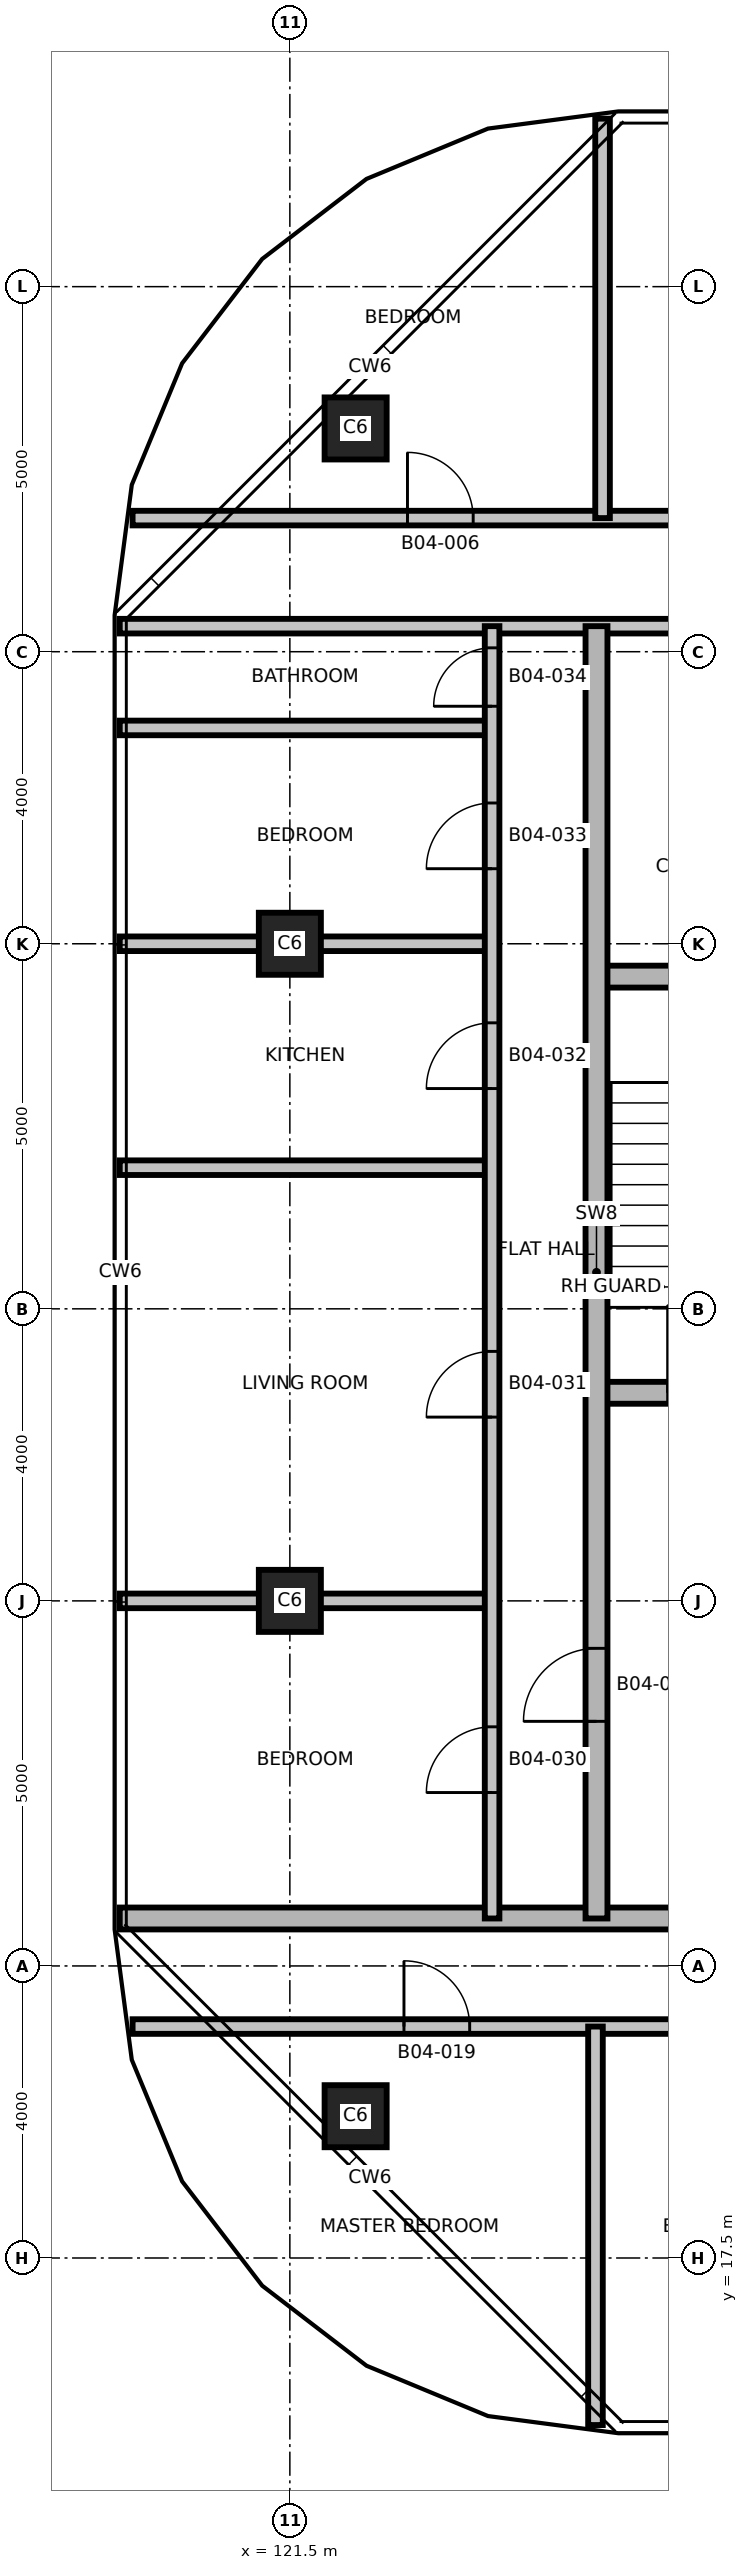
"""IFC4 building model, lengths in metres.
Left out: names, types, materials, properties, quantities, classifications, styles, units other than length and angle.
Written with IfcOpenShell. Run it as: python <this file> out.ifc"""

import sys

from ifc_helpers import new_model, si_unit, direction, frame, frame_2d, origin, origin_2d, place, context, subcontext, project, spatial, rectangle, extrude, element, fill, save


model = new_model("IFC4")
c1 = context("Model", 3, precision=1e-05, world=origin(), true_north=direction((0.0, 1.0)))
c2 = subcontext(c1, "Body", "Model", "MODEL_VIEW")
j1 = project(units=[si_unit("LENGTHUNIT", "METRE"), si_unit("PLANEANGLEUNIT", "RADIAN")], contexts=[c1])
p1 = place(None, origin())
s1 = spatial("IfcSite", under=j1, at=p1, CompositionType="ELEMENT")
p2 = place(p1, origin())
s2 = spatial("IfcBuilding", under=s1, at=p2, CompositionType="ELEMENT")
p3 = place(p2, frame((0.0, 0.0, 66.8)))
s3 = spatial("IfcBuildingStorey", under=s2, at=p3, CompositionType="ELEMENT", Elevation=66.8)
for number, where, z_axis, x_axis in (
    (1, (122.401, 19.442, 0.0), (0.0, 0.0, 1.0), (1.0, 0.0, 0.0)),
    (2, (121.5, 26.5, 0.0), (0.0, 0.0, 1.0), (1.0, 0.0, 0.0)),
    (3, (121.5, 35.5, 0.0), (0.0, 0.0, 1.0), (1.0, 0.0, 0.0)),
    (4, (122.401, 42.558, 0.0), (0.0, 0.0, 1.0), (1.0, 0.0, 0.0)),
):
    element("IfcColumn", number, at=place(p3, frame(where, z_axis=z_axis, x_axis=x_axis)), inside=s3, PredefinedType="COLUMN", context=c2, shape_type="SweptSolid", body=[
        extrude(rectangle(XDim=0.85, YDim=0.85, at=origin_2d()), origin(), (0.0, 0.0, 1.0), 3.7),
    ])
p4 = place(p3, frame((119.346, 20.67, 0.0), z_axis=(0.0, 0.0, 1.0), x_axis=(1.0, 0.0, 0.0)))
e5 = element("IfcWall", 5, at=p4, inside=s3, PredefinedType="PARTITIONING", context=c2, shape_type="SweptSolid", body=[
    extrude(rectangle(XDim=17.154, YDim=0.2, at=frame_2d((8.577, 0.0))), origin(), (0.0, 0.0, 1.0), 3.4),
])
p5 = place(p4, frame((3.717, 0.0, 0.0)))
e6 = element("IfcOpeningElement", 6, at=p5, cuts=e5, PredefinedType="OPENING", context=c2, shape_type="SweptSolid", body=[
    extrude(rectangle(XDim=0.9, YDim=2.1, at=frame_2d((0.45, 1.05))), frame((0.0, 0.11, 0.0), z_axis=(0.0, -1.0, 0.0), x_axis=(1.0, 0.0, 0.0)), (0.0, 0.0, 1.0), 0.22),
])
p6 = place(p4, frame((7.597, 0.0, 0.0)))
e7 = element("IfcOpeningElement", 7, at=p6, cuts=e5, PredefinedType="OPENING", context=c2, shape_type="SweptSolid", body=[
    extrude(rectangle(XDim=0.8, YDim=2.1, at=frame_2d((0.4, 1.05))), frame((0.0, 0.11, 0.0), z_axis=(0.0, -1.0, 0.0), x_axis=(1.0, 0.0, 0.0)), (0.0, 0.0, 1.0), 0.22),
])
p7 = place(p4, frame((11.671, 0.0, 0.0)))
e8 = element("IfcOpeningElement", 8, at=p7, cuts=e5, PredefinedType="OPENING", context=c2, shape_type="SweptSolid", body=[
    extrude(rectangle(XDim=0.9, YDim=2.1, at=frame_2d((0.45, 1.05))), frame((0.0, 0.11, 0.0), z_axis=(0.0, -1.0, 0.0), x_axis=(1.0, 0.0, 0.0)), (0.0, 0.0, 1.0), 0.22),
])
p8 = place(p4, frame((15.421, 0.0, 0.0)))
e9 = element("IfcOpeningElement", 9, at=p8, cuts=e5, PredefinedType="OPENING", context=c2, shape_type="SweptSolid", body=[
    extrude(rectangle(XDim=0.9, YDim=2.1, at=frame_2d((0.45, 1.05))), frame((0.0, 0.11, 0.0), z_axis=(0.0, -1.0, 0.0), x_axis=(1.0, 0.0, 0.0)), (0.0, 0.0, 1.0), 0.22),
])
p9 = place(p3, frame((119.17, 22.15, 0.0), z_axis=(0.0, 0.0, 1.0), x_axis=(1.0, 0.0, 0.0)))
e10 = element("IfcWall", 10, at=p9, inside=s3, PredefinedType="SHEAR", context=c2, shape_type="SweptSolid", body=[
    extrude(rectangle(XDim=34.66, YDim=0.3, at=frame_2d((17.33, 0.0))), origin(), (0.0, 0.0, 1.0), 3.4),
])
p10 = place(p9, frame((23.58, 0.0, 0.0)))
e11 = element("IfcOpeningElement", 11, at=p10, cuts=e10, PredefinedType="OPENING", context=c2, shape_type="SweptSolid", body=[
    extrude(rectangle(XDim=1.0, YDim=2.1, at=frame_2d((0.5, 1.05))), frame((0.0, 0.16, 0.0), z_axis=(0.0, -1.0, 0.0), x_axis=(1.0, 0.0, 0.0)), (0.0, 0.0, 1.0), 0.32),
])
p11 = place(p9, frame((11.93, 0.0, 0.0)))
e12 = element("IfcOpeningElement", 12, at=p11, cuts=e10, PredefinedType="OPENING", context=c2, shape_type="SweptSolid", body=[
    extrude(rectangle(XDim=1.0, YDim=2.1, at=frame_2d((0.5, 1.05))), frame((0.0, 0.16, 0.0), z_axis=(0.0, -1.0, 0.0), x_axis=(1.0, 0.0, 0.0)), (0.0, 0.0, 1.0), 0.32),
])
p12 = place(p9, frame((25.48, 0.0, 0.0)))
e13 = element("IfcOpeningElement", 13, at=p12, cuts=e10, PredefinedType="OPENING", context=c2, shape_type="SweptSolid", body=[
    extrude(rectangle(XDim=1.0, YDim=2.1, at=frame_2d((0.5, 1.05))), frame((0.0, 0.16, 0.0), z_axis=(0.0, -1.0, 0.0), x_axis=(1.0, 0.0, 0.0)), (0.0, 0.0, 1.0), 0.32),
])
p13 = place(p9, frame((17.58, 0.0, 0.0)))
e14 = element("IfcOpeningElement", 14, at=p13, cuts=e10, PredefinedType="OPENING", context=c2, shape_type="SweptSolid", body=[
    extrude(rectangle(XDim=0.9, YDim=2.1, at=frame_2d((0.45, 1.05))), frame((0.0, 0.16, 0.0), z_axis=(0.0, -1.0, 0.0), x_axis=(1.0, 0.0, 0.0)), (0.0, 0.0, 1.0), 0.32),
])
p14 = place(p3, frame((119.17, 26.5, 0.0), z_axis=(0.0, 0.0, 1.0), x_axis=(1.0, 0.0, 0.0)))
e15 = element("IfcWall", 15, at=p14, inside=s3, PredefinedType="PARTITIONING", context=c2, shape_type="SweptSolid", body=[
    extrude(rectangle(XDim=5.1, YDim=0.2, at=frame_2d((2.55, 0.0))), origin(), (0.0, 0.0, 1.0), 3.4),
])
p15 = place(p3, frame((125.7, 29.35, 0.0), z_axis=(0.0, 0.0, 1.0), x_axis=(1.0, 0.0, 0.0)))
e16 = element("IfcWall", 16, at=p15, inside=s3, PredefinedType="SHEAR", context=c2, shape_type="SweptSolid", body=[
    extrude(rectangle(XDim=2.83, YDim=0.3, at=frame_2d((1.415, 0.0))), origin(), (0.0, 0.0, 1.0), 3.4),
])
p16 = place(p15, frame((0.975, 0.0, 0.0)))
e17 = element("IfcOpeningElement", 17, at=p16, cuts=e16, PredefinedType="OPENING", context=c2, shape_type="SweptSolid", body=[
    extrude(rectangle(XDim=1.2, YDim=2.1, at=frame_2d((0.6, 1.05))), frame((0.0, 0.16, 0.0), z_axis=(0.0, -1.0, 0.0), x_axis=(1.0, 0.0, 0.0)), (0.0, 0.0, 1.0), 0.32),
])
p17 = place(p3, frame((119.17, 32.433, 0.0), z_axis=(0.0, 0.0, 1.0), x_axis=(1.0, 0.0, 0.0)))
e18 = element("IfcWall", 18, at=p17, inside=s3, PredefinedType="PARTITIONING", context=c2, shape_type="SweptSolid", body=[
    extrude(rectangle(XDim=5.1, YDim=0.2, at=frame_2d((2.55, 0.0))), origin(), (0.0, 0.0, 1.0), 3.4),
])
p18 = place(p3, frame((125.7, 35.05, 0.0), z_axis=(0.0, 0.0, 1.0), x_axis=(1.0, 0.0, 0.0)))
e19 = element("IfcWall", 19, at=p18, inside=s3, PredefinedType="SHEAR", context=c2, shape_type="SweptSolid", body=[
    extrude(rectangle(XDim=2.83, YDim=0.3, at=frame_2d((1.415, 0.0))), origin(), (0.0, 0.0, 1.0), 3.4),
])
for number, where, z_axis, x_axis in (
    (20, (119.17, 35.5, 0.0), (0.0, 0.0, 1.0), (1.0, 0.0, 0.0)),
    (21, (119.17, 38.456, 0.0), (0.0, 0.0, 1.0), (1.0, 0.0, 0.0)),
):
    element("IfcWall", number, at=place(p3, frame(where, z_axis=z_axis, x_axis=x_axis)), inside=s3, PredefinedType="PARTITIONING", context=c2, shape_type="SweptSolid", body=[
        extrude(rectangle(XDim=5.1, YDim=0.2, at=frame_2d((2.55, 0.0))), origin(), (0.0, 0.0, 1.0), 3.4),
    ])
p19 = place(p3, frame((119.17, 39.85, 0.0), z_axis=(0.0, 0.0, 1.0), x_axis=(1.0, 0.0, 0.0)))
e22 = element("IfcWall", 22, at=p19, inside=s3, PredefinedType="PARTITIONING", context=c2, shape_type="SweptSolid", body=[
    extrude(rectangle(XDim=34.66, YDim=0.2, at=frame_2d((17.33, 0.0))), origin(), (0.0, 0.0, 1.0), 3.4),
])
p20 = place(p19, frame((11.93, 0.0, 0.0)))
e23 = element("IfcOpeningElement", 23, at=p20, cuts=e22, PredefinedType="OPENING", context=c2, shape_type="SweptSolid", body=[
    extrude(rectangle(XDim=1.0, YDim=2.1, at=frame_2d((0.5, 1.05))), frame((0.0, 0.11, 0.0), z_axis=(0.0, -1.0, 0.0), x_axis=(1.0, 0.0, 0.0)), (0.0, 0.0, 1.0), 0.22),
])
p21 = place(p19, frame((20.58, 0.0, 0.0)))
e24 = element("IfcOpeningElement", 24, at=p21, cuts=e22, PredefinedType="OPENING", context=c2, shape_type="SweptSolid", body=[
    extrude(rectangle(XDim=1.0, YDim=2.1, at=frame_2d((0.5, 1.05))), frame((0.0, 0.11, 0.0), z_axis=(0.0, -1.0, 0.0), x_axis=(1.0, 0.0, 0.0)), (0.0, 0.0, 1.0), 0.22),
])
p22 = place(p19, frame((25.48, 0.0, 0.0)))
e25 = element("IfcOpeningElement", 25, at=p22, cuts=e22, PredefinedType="OPENING", context=c2, shape_type="SweptSolid", body=[
    extrude(rectangle(XDim=1.0, YDim=2.1, at=frame_2d((0.5, 1.05))), frame((0.0, 0.11, 0.0), z_axis=(0.0, -1.0, 0.0), x_axis=(1.0, 0.0, 0.0)), (0.0, 0.0, 1.0), 0.22),
])
p23 = place(p3, frame((119.346, 41.33, 0.0), z_axis=(0.0, 0.0, 1.0), x_axis=(1.0, 0.0, 0.0)))
e26 = element("IfcWall", 26, at=p23, inside=s3, PredefinedType="PARTITIONING", context=c2, shape_type="SweptSolid", body=[
    extrude(rectangle(XDim=34.308, YDim=0.2, at=frame_2d((17.154, 0.0))), origin(), (0.0, 0.0, 1.0), 3.4),
])
p24 = place(p23, frame((3.765, 0.0, 0.0)))
e27 = element("IfcOpeningElement", 27, at=p24, cuts=e26, PredefinedType="OPENING", context=c2, shape_type="SweptSolid", body=[
    extrude(rectangle(XDim=0.9, YDim=2.1, at=frame_2d((0.45, 1.05))), frame((0.0, 0.11, 0.0), z_axis=(0.0, -1.0, 0.0), x_axis=(1.0, 0.0, 0.0)), (0.0, 0.0, 1.0), 0.22),
])
p25 = place(p23, frame((7.645, 0.0, 0.0)))
e28 = element("IfcOpeningElement", 28, at=p25, cuts=e26, PredefinedType="OPENING", context=c2, shape_type="SweptSolid", body=[
    extrude(rectangle(XDim=0.8, YDim=2.1, at=frame_2d((0.4, 1.05))), frame((0.0, 0.11, 0.0), z_axis=(0.0, -1.0, 0.0), x_axis=(1.0, 0.0, 0.0)), (0.0, 0.0, 1.0), 0.22),
])
p26 = place(p23, frame((11.671, 0.0, 0.0)))
e29 = element("IfcOpeningElement", 29, at=p26, cuts=e26, PredefinedType="OPENING", context=c2, shape_type="SweptSolid", body=[
    extrude(rectangle(XDim=0.9, YDim=2.1, at=frame_2d((0.45, 1.05))), frame((0.0, 0.11, 0.0), z_axis=(0.0, -1.0, 0.0), x_axis=(1.0, 0.0, 0.0)), (0.0, 0.0, 1.0), 0.22),
])
p27 = place(p23, frame((15.421, 0.0, 0.0)))
e30 = element("IfcOpeningElement", 30, at=p27, cuts=e26, PredefinedType="OPENING", context=c2, shape_type="SweptSolid", body=[
    extrude(rectangle(XDim=0.9, YDim=2.1, at=frame_2d((0.45, 1.05))), frame((0.0, 0.11, 0.0), z_axis=(0.0, -1.0, 0.0), x_axis=(1.0, 0.0, 0.0)), (0.0, 0.0, 1.0), 0.22),
])
p28 = place(p23, frame((18.756, 0.0, 0.0)))
e31 = element("IfcOpeningElement", 31, at=p28, cuts=e26, PredefinedType="OPENING", context=c2, shape_type="SweptSolid", body=[
    extrude(rectangle(XDim=0.9, YDim=2.1, at=frame_2d((0.45, 1.05))), frame((0.0, 0.11, 0.0), z_axis=(0.0, -1.0, 0.0), x_axis=(1.0, 0.0, 0.0)), (0.0, 0.0, 1.0), 0.22),
])
p29 = place(p23, frame((21.725, 0.0, 0.0)))
e32 = element("IfcOpeningElement", 32, at=p29, cuts=e26, PredefinedType="OPENING", context=c2, shape_type="SweptSolid", body=[
    extrude(rectangle(XDim=0.9, YDim=2.1, at=frame_2d((0.45, 1.05))), frame((0.0, 0.11, 0.0), z_axis=(0.0, -1.0, 0.0), x_axis=(1.0, 0.0, 0.0)), (0.0, 0.0, 1.0), 0.22),
])
p30 = place(p23, frame((23.473, 0.0, 0.0)))
e33 = element("IfcOpeningElement", 33, at=p30, cuts=e26, PredefinedType="OPENING", context=c2, shape_type="SweptSolid", body=[
    extrude(rectangle(XDim=0.8, YDim=2.1, at=frame_2d((0.4, 1.05))), frame((0.0, 0.11, 0.0), z_axis=(0.0, -1.0, 0.0), x_axis=(1.0, 0.0, 0.0)), (0.0, 0.0, 1.0), 0.22),
])
p31 = place(p23, frame((25.282, 0.0, 0.0)))
e34 = element("IfcOpeningElement", 34, at=p31, cuts=e26, PredefinedType="OPENING", context=c2, shape_type="SweptSolid", body=[
    extrude(rectangle(XDim=0.8, YDim=2.1, at=frame_2d((0.4, 1.05))), frame((0.0, 0.11, 0.0), z_axis=(0.0, -1.0, 0.0), x_axis=(1.0, 0.0, 0.0)), (0.0, 0.0, 1.0), 0.22),
])
p32 = place(p23, frame((27.472, 0.0, 0.0)))
e35 = element("IfcOpeningElement", 35, at=p32, cuts=e26, PredefinedType="OPENING", context=c2, shape_type="SweptSolid", body=[
    extrude(rectangle(XDim=0.9, YDim=2.1, at=frame_2d((0.45, 1.05))), frame((0.0, 0.11, 0.0), z_axis=(0.0, -1.0, 0.0), x_axis=(1.0, 0.0, 0.0)), (0.0, 0.0, 1.0), 0.22),
])
p33 = place(p23, frame((32.025, 0.0, 0.0)))
e36 = element("IfcOpeningElement", 36, at=p33, cuts=e26, PredefinedType="OPENING", context=c2, shape_type="SweptSolid", body=[
    extrude(rectangle(XDim=0.9, YDim=2.1, at=frame_2d((0.45, 1.05))), frame((0.0, 0.11, 0.0), z_axis=(0.0, -1.0, 0.0), x_axis=(1.0, 0.0, 0.0)), (0.0, 0.0, 1.0), 0.22),
])
p34 = place(p3, frame((124.27, 22.15, 0.0), z_axis=(0.0, 0.0, 1.0), x_axis=(0.0, 1.0, 0.0)))
e37 = element("IfcWall", 37, at=p34, inside=s3, PredefinedType="PARTITIONING", context=c2, shape_type="SweptSolid", body=[
    extrude(rectangle(XDim=17.7, YDim=0.2, at=frame_2d((8.85, 0.0))), origin(), (0.0, 0.0, 1.0), 3.4),
])
p35 = place(p34, frame((1.725, 0.0, 0.0)))
e38 = element("IfcOpeningElement", 38, at=p35, cuts=e37, PredefinedType="OPENING", context=c2, shape_type="SweptSolid", body=[
    extrude(rectangle(XDim=0.9, YDim=2.1, at=frame_2d((0.45, 1.05))), frame((0.0, 0.11, 0.0), z_axis=(0.0, -1.0, 0.0), x_axis=(1.0, 0.0, 0.0)), (0.0, 0.0, 1.0), 0.22),
])
p36 = place(p34, frame((6.867, 0.0, 0.0)))
e39 = element("IfcOpeningElement", 39, at=p36, cuts=e37, PredefinedType="OPENING", context=c2, shape_type="SweptSolid", body=[
    extrude(rectangle(XDim=0.9, YDim=2.1, at=frame_2d((0.45, 1.05))), frame((0.0, 0.11, 0.0), z_axis=(0.0, -1.0, 0.0), x_axis=(1.0, 0.0, 0.0)), (0.0, 0.0, 1.0), 0.22),
])
p37 = place(p34, frame((11.367, 0.0, 0.0)))
e40 = element("IfcOpeningElement", 40, at=p37, cuts=e37, PredefinedType="OPENING", context=c2, shape_type="SweptSolid", body=[
    extrude(rectangle(XDim=0.9, YDim=2.1, at=frame_2d((0.45, 1.05))), frame((0.0, 0.11, 0.0), z_axis=(0.0, -1.0, 0.0), x_axis=(1.0, 0.0, 0.0)), (0.0, 0.0, 1.0), 0.22),
])
p38 = place(p34, frame((14.378, 0.0, 0.0)))
e41 = element("IfcOpeningElement", 41, at=p38, cuts=e37, PredefinedType="OPENING", context=c2, shape_type="SweptSolid", body=[
    extrude(rectangle(XDim=0.9, YDim=2.1, at=frame_2d((0.45, 1.05))), frame((0.0, 0.11, 0.0), z_axis=(0.0, -1.0, 0.0), x_axis=(1.0, 0.0, 0.0)), (0.0, 0.0, 1.0), 0.22),
])
p39 = place(p34, frame((16.603, 0.0, 0.0)))
e42 = element("IfcOpeningElement", 42, at=p39, cuts=e37, PredefinedType="OPENING", context=c2, shape_type="SweptSolid", body=[
    extrude(rectangle(XDim=0.8, YDim=2.1, at=frame_2d((0.4, 1.05))), frame((0.0, 0.11, 0.0), z_axis=(0.0, -1.0, 0.0), x_axis=(1.0, 0.0, 0.0)), (0.0, 0.0, 1.0), 0.22),
])
p40 = place(p3, frame((125.686, 15.212, 0.0), z_axis=(0.0, 0.0, 1.0), x_axis=(0.0, 1.0, 0.0)))
e43 = element("IfcWall", 43, at=p40, inside=s3, PredefinedType="PARTITIONING", context=c2, shape_type="SweptSolid", body=[
    extrude(rectangle(XDim=5.458, YDim=0.2, at=frame_2d((2.729, 0.0))), origin(), (0.0, 0.0, 1.0), 3.4),
])
p41 = place(p3, frame((125.7, 22.15, 0.0), z_axis=(0.0, 0.0, 1.0), x_axis=(0.0, 1.0, 0.0)))
e44 = element("IfcWall", 44, at=p41, inside=s3, PredefinedType="SHEAR", context=c2, shape_type="SweptSolid", body=[
    extrude(rectangle(XDim=17.7, YDim=0.3, at=frame_2d((8.85, 0.0))), origin(), (0.0, 0.0, 1.0), 3.4),
])
p42 = place(p41, frame((2.7, 0.0, 0.0)))
e45 = element("IfcOpeningElement", 45, at=p42, cuts=e44, PredefinedType="OPENING", context=c2, shape_type="SweptSolid", body=[
    extrude(rectangle(XDim=1.0, YDim=2.1, at=frame_2d((0.5, 1.05))), frame((0.0, 0.16, 0.0), z_axis=(0.0, -1.0, 0.0), x_axis=(1.0, 0.0, 0.0)), (0.0, 0.0, 1.0), 0.32),
])
p43 = place(p3, frame((125.783, 41.33, 0.0), z_axis=(0.0, 0.0, 1.0), x_axis=(0.0, 1.0, 0.0)))
e46 = element("IfcWall", 46, at=p43, inside=s3, PredefinedType="PARTITIONING", context=c2, shape_type="SweptSolid", body=[
    extrude(rectangle(XDim=5.471, YDim=0.2, at=frame_2d((2.735, 0.0))), origin(), (0.0, 0.0, 1.0), 3.4),
])
p44 = place(p16, origin())
e47 = element("IfcDoor", 47, at=p44, inside=s3, OperationType="SINGLE_SWING_RIGHT", PredefinedType="DOOR", context=c2, shape_type="SweptSolid", body=[
    extrude(rectangle(XDim=1.2, YDim=2.1, at=frame_2d((0.6, 1.05))), frame((0.0, 0.025, 0.0), z_axis=(0.0, -1.0, 0.0), x_axis=(1.0, 0.0, 0.0)), (0.0, 0.0, 1.0), 0.05),
])
fill(e17, e47)
p45 = place(p24, origin())
e48 = element("IfcDoor", 48, at=p45, inside=s3, OperationType="SINGLE_SWING_RIGHT", PredefinedType="DOOR", context=c2, shape_type="SweptSolid", body=[
    extrude(rectangle(XDim=0.9, YDim=2.1, at=frame_2d((0.45, 1.05))), frame((0.0, 0.025, 0.0), z_axis=(0.0, -1.0, 0.0), x_axis=(1.0, 0.0, 0.0)), (0.0, 0.0, 1.0), 0.05),
])
fill(e27, e48)
p46 = place(p5, origin())
e49 = element("IfcDoor", 49, at=p46, inside=s3, OperationType="SINGLE_SWING_LEFT", PredefinedType="DOOR", context=c2, shape_type="SweptSolid", body=[
    extrude(rectangle(XDim=0.9, YDim=2.1, at=frame_2d((0.45, 1.05))), frame((0.0, 0.025, 0.0), z_axis=(0.0, -1.0, 0.0), x_axis=(1.0, 0.0, 0.0)), (0.0, 0.0, 1.0), 0.05),
])
fill(e6, e49)
p47 = place(p42, origin())
e50 = element("IfcDoor", 50, at=p47, inside=s3, OperationType="SINGLE_SWING_LEFT", PredefinedType="DOOR", context=c2, shape_type="SweptSolid", body=[
    extrude(rectangle(XDim=1.0, YDim=2.1, at=frame_2d((0.5, 1.05))), frame((0.0, 0.025, 0.0), z_axis=(0.0, -1.0, 0.0), x_axis=(1.0, 0.0, 0.0)), (0.0, 0.0, 1.0), 0.05),
])
fill(e45, e50)
p48 = place(p35, origin())
e51 = element("IfcDoor", 51, at=p48, inside=s3, OperationType="SINGLE_SWING_RIGHT", PredefinedType="DOOR", context=c2, shape_type="SweptSolid", body=[
    extrude(rectangle(XDim=0.9, YDim=2.1, at=frame_2d((0.45, 1.05))), frame((0.0, 0.025, 0.0), z_axis=(0.0, -1.0, 0.0), x_axis=(1.0, 0.0, 0.0)), (0.0, 0.0, 1.0), 0.05),
])
fill(e38, e51)
p49 = place(p36, origin())
e52 = element("IfcDoor", 52, at=p49, inside=s3, OperationType="SINGLE_SWING_LEFT", PredefinedType="DOOR", context=c2, shape_type="SweptSolid", body=[
    extrude(rectangle(XDim=0.9, YDim=2.1, at=frame_2d((0.45, 1.05))), frame((0.0, 0.025, 0.0), z_axis=(0.0, -1.0, 0.0), x_axis=(1.0, 0.0, 0.0)), (0.0, 0.0, 1.0), 0.05),
])
fill(e39, e52)
p50 = place(p37, origin())
e53 = element("IfcDoor", 53, at=p50, inside=s3, OperationType="SINGLE_SWING_RIGHT", PredefinedType="DOOR", context=c2, shape_type="SweptSolid", body=[
    extrude(rectangle(XDim=0.9, YDim=2.1, at=frame_2d((0.45, 1.05))), frame((0.0, 0.025, 0.0), z_axis=(0.0, -1.0, 0.0), x_axis=(1.0, 0.0, 0.0)), (0.0, 0.0, 1.0), 0.05),
])
fill(e40, e53)
p51 = place(p38, origin())
e54 = element("IfcDoor", 54, at=p51, inside=s3, OperationType="SINGLE_SWING_LEFT", PredefinedType="DOOR", context=c2, shape_type="SweptSolid", body=[
    extrude(rectangle(XDim=0.9, YDim=2.1, at=frame_2d((0.45, 1.05))), frame((0.0, 0.025, 0.0), z_axis=(0.0, -1.0, 0.0), x_axis=(1.0, 0.0, 0.0)), (0.0, 0.0, 1.0), 0.05),
])
fill(e41, e54)
p52 = place(p39, origin())
e55 = element("IfcDoor", 55, at=p52, inside=s3, OperationType="SINGLE_SWING_RIGHT", PredefinedType="DOOR", context=c2, shape_type="SweptSolid", body=[
    extrude(rectangle(XDim=0.8, YDim=2.1, at=frame_2d((0.4, 1.05))), frame((0.0, 0.025, 0.0), z_axis=(0.0, -1.0, 0.0), x_axis=(1.0, 0.0, 0.0)), (0.0, 0.0, 1.0), 0.05),
])
fill(e42, e55)
save(model, sys.argv[1])
